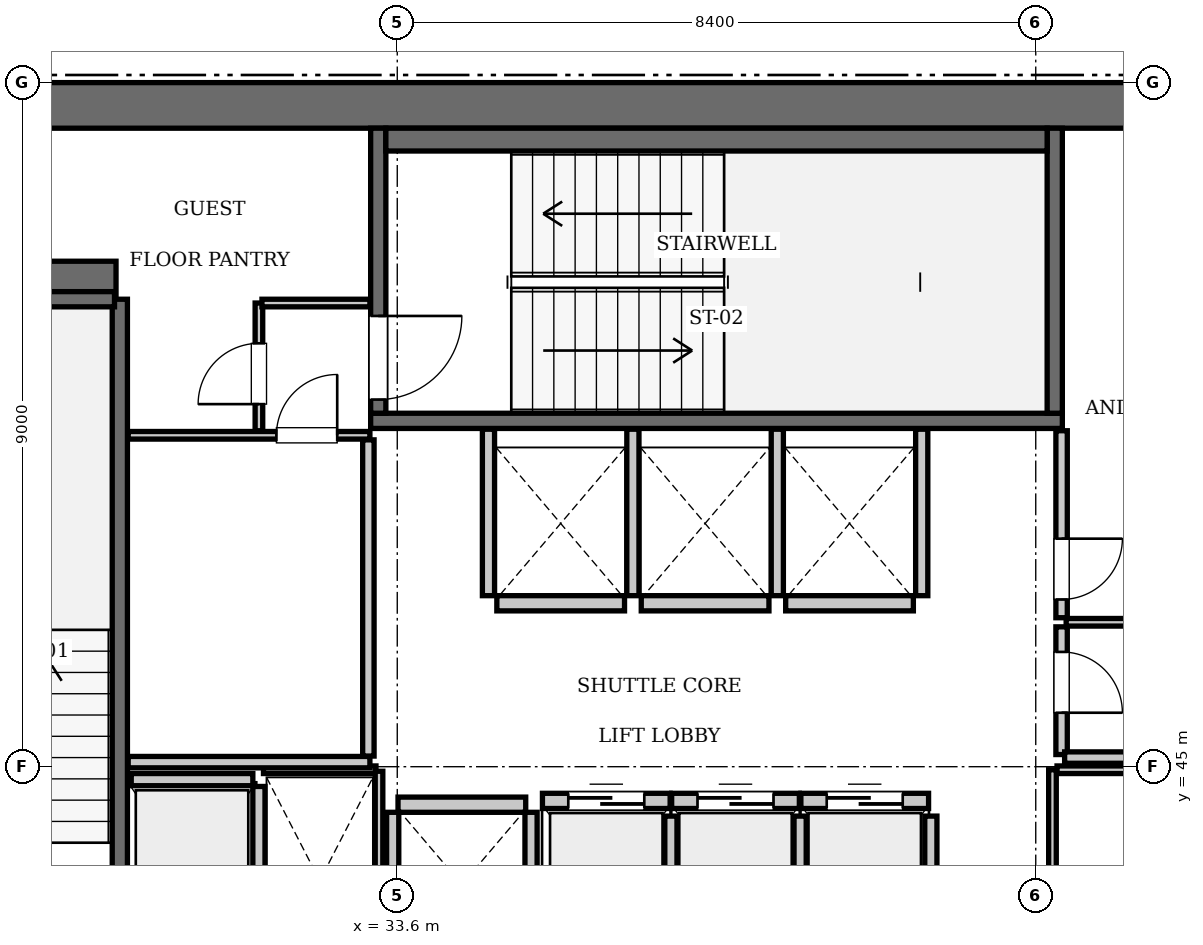
"""IFC4 building model, lengths in metres.
Left out: names, types, materials, properties, quantities, classifications, styles, units other than length and angle.
Written with IfcOpenShell. Run it as: python <this file> out.ifc"""

import sys

from ifc_helpers import new_model, si_unit, direction, frame, frame_2d, origin, place, context, subcontext, project, spatial, rectangle, extrude, element, fill, save


model = new_model("IFC4")
c1 = context("Model", 3, precision=1e-05, world=origin(), true_north=direction((0.0, 1.0)))
c2 = subcontext(c1, "Body", "Model", "MODEL_VIEW")
j1 = project(units=[si_unit("LENGTHUNIT", "METRE"), si_unit("PLANEANGLEUNIT", "RADIAN")], contexts=[c1])
p1 = place(None, origin())
s1 = spatial("IfcSite", under=j1, at=p1, CompositionType="ELEMENT")
p2 = place(p1, origin())
s2 = spatial("IfcBuilding", under=s1, at=p2, CompositionType="ELEMENT")
p3 = place(p2, frame((0.0, 0.0, 322.0)))
s3 = spatial("IfcBuildingStorey", under=s2, at=p3, CompositionType="ELEMENT", Elevation=322.0)
p4 = place(p3, frame((25.2, 53.7, 0.0), z_axis=(0.0, 0.0, 1.0), x_axis=(1.0, 0.0, 0.0)))
e1 = element("IfcWall", 1, at=p4, inside=s3, PredefinedType="SHEAR", context=c2, shape_type="SweptSolid", body=[
    extrude(rectangle(XDim=25.2, YDim=0.6, at=frame_2d((12.6, 0.0))), origin(), (0.0, 0.0, 1.0), 3.85),
])
p5 = place(p3, frame((25.8, 51.4, 0.0), z_axis=(0.0, 0.0, 1.0), x_axis=(1.0, 0.0, 0.0)))
e2 = element("IfcWall", 2, at=p5, inside=s3, PredefinedType="SHEAR", context=c2, shape_type="SweptSolid", body=[
    extrude(rectangle(XDim=4.1, YDim=0.5, at=frame_2d((2.05, 0.0))), origin(), (0.0, 0.0, 1.0), 3.85),
])
p6 = place(p3, frame((29.95, 42.0, 0.0), z_axis=(0.0, 0.0, 1.0), x_axis=(0.0, 1.0, 0.0)))
e3 = element("IfcWall", 3, at=p6, inside=s3, PredefinedType="SOLIDWALL", context=c2, shape_type="SweptSolid", body=[
    extrude(rectangle(XDim=9.15, YDim=0.2, at=frame_2d((4.575, 0.0))), origin(), (0.0, 0.0, 1.0), 3.61),
])
p7 = place(p3, frame((26.38, 51.15, 0.0), z_axis=(0.0, 0.0, 1.0), x_axis=(1.0, 0.0, 0.0)))
e4 = element("IfcWall", 4, at=p7, inside=s3, PredefinedType="SOLIDWALL", context=c2, shape_type="SweptSolid", body=[
    extrude(rectangle(XDim=3.5, YDim=0.2, at=frame_2d((1.75, 0.0))), origin(), (0.0, 0.0, 1.0), 3.61),
])
p8 = place(p3, frame((33.25, 49.55, 0.0), z_axis=(0.0, 0.0, 1.0), x_axis=(1.0, 0.0, 0.0)))
e5 = element("IfcWall", 5, at=p8, inside=s3, PredefinedType="SOLIDWALL", context=c2, shape_type="SweptSolid", body=[
    extrude(rectangle(XDim=9.1, YDim=0.2, at=frame_2d((4.55, 0.0))), origin(), (0.0, 0.0, 1.0), 3.61),
])
p9 = place(p3, frame((42.25, 49.65, 0.0), z_axis=(0.0, 0.0, 1.0), x_axis=(0.0, 1.0, 0.0)))
e6 = element("IfcWall", 6, at=p9, inside=s3, PredefinedType="SOLIDWALL", context=c2, shape_type="SweptSolid", body=[
    extrude(rectangle(XDim=3.75, YDim=0.2, at=frame_2d((1.875, 0.0))), origin(), (0.0, 0.0, 1.0), 3.61),
])
p10 = place(p3, frame((33.35, 49.65, 0.0), z_axis=(0.0, 0.0, 1.0), x_axis=(0.0, 1.0, 0.0)))
e7 = element("IfcWall", 7, at=p10, inside=s3, PredefinedType="SOLIDWALL", context=c2, shape_type="SweptSolid", body=[
    extrude(rectangle(XDim=3.75, YDim=0.2, at=frame_2d((1.875, 0.0))), origin(), (0.0, 0.0, 1.0), 3.61),
])
p11 = place(p10, frame((0.18, 0.0, 0.0)))
e8 = element("IfcOpeningElement", 8, at=p11, cuts=e7, PredefinedType="OPENING", context=c2, shape_type="SweptSolid", body=[
    extrude(rectangle(XDim=1.1, YDim=2.15, at=frame_2d((0.55, 1.075))), frame((0.0, 0.11, 0.0), z_axis=(0.0, -1.0, 0.0), x_axis=(1.0, 0.0, 0.0)), (0.0, 0.0, 1.0), 0.22),
])
p12 = place(p3, frame((33.45, 53.25, 0.0), z_axis=(0.0, 0.0, 1.0), x_axis=(1.0, 0.0, 0.0)))
e9 = element("IfcWall", 9, at=p12, inside=s3, PredefinedType="SOLIDWALL", context=c2, shape_type="SweptSolid", body=[
    extrude(rectangle(XDim=8.7, YDim=0.3, at=frame_2d((4.35, 0.0))), origin(), (0.0, 0.0, 1.0), 3.61),
])
p13 = place(p3, frame((35.51, 44.55, 0.0), z_axis=(0.0, 0.0, 1.0), x_axis=(1.0, 0.0, 0.0)))
e10 = element("IfcWall", 10, at=p13, inside=s3, PredefinedType="SOLIDWALL", context=c2, shape_type="SweptSolid", body=[
    extrude(rectangle(XDim=1.68, YDim=0.2, at=frame_2d((0.84, 0.0))), origin(), (0.0, 0.0, 1.0), 3.61),
])
p14 = place(p13, frame((0.34, 0.0, 0.0)))
e11 = element("IfcOpeningElement", 11, at=p14, cuts=e10, PredefinedType="OPENING", context=c2, shape_type="SweptSolid", body=[
    extrude(rectangle(XDim=1.0, YDim=2.15, at=frame_2d((0.5, 1.075))), frame((0.0, 0.11, 0.0), z_axis=(0.0, -1.0, 0.0), x_axis=(1.0, 0.0, 0.0)), (0.0, 0.0, 1.0), 0.22),
])
p15 = place(p3, frame((37.21, 44.55, 0.0), z_axis=(0.0, 0.0, 1.0), x_axis=(1.0, 0.0, 0.0)))
e12 = element("IfcWall", 12, at=p15, inside=s3, PredefinedType="SOLIDWALL", context=c2, shape_type="SweptSolid", body=[
    extrude(rectangle(XDim=1.68, YDim=0.2, at=frame_2d((0.84, 0.0))), origin(), (0.0, 0.0, 1.0), 3.61),
])
p16 = place(p15, frame((0.34, 0.0, 0.0)))
e13 = element("IfcOpeningElement", 13, at=p16, cuts=e12, PredefinedType="OPENING", context=c2, shape_type="SweptSolid", body=[
    extrude(rectangle(XDim=1.0, YDim=2.15, at=frame_2d((0.5, 1.075))), frame((0.0, 0.11, 0.0), z_axis=(0.0, -1.0, 0.0), x_axis=(1.0, 0.0, 0.0)), (0.0, 0.0, 1.0), 0.22),
])
p17 = place(p3, frame((38.91, 44.55, 0.0), z_axis=(0.0, 0.0, 1.0), x_axis=(1.0, 0.0, 0.0)))
e14 = element("IfcWall", 14, at=p17, inside=s3, PredefinedType="SOLIDWALL", context=c2, shape_type="SweptSolid", body=[
    extrude(rectangle(XDim=1.68, YDim=0.2, at=frame_2d((0.84, 0.0))), origin(), (0.0, 0.0, 1.0), 3.61),
])
p18 = place(p17, frame((0.34, 0.0, 0.0)))
e15 = element("IfcOpeningElement", 15, at=p18, cuts=e14, PredefinedType="OPENING", context=c2, shape_type="SweptSolid", body=[
    extrude(rectangle(XDim=1.0, YDim=2.15, at=frame_2d((0.5, 1.075))), frame((0.0, 0.11, 0.0), z_axis=(0.0, -1.0, 0.0), x_axis=(1.0, 0.0, 0.0)), (0.0, 0.0, 1.0), 0.22),
])
p19 = place(p3, frame((34.91, 47.15, 0.0), z_axis=(0.0, 0.0, 1.0), x_axis=(1.0, 0.0, 0.0)))
e16 = element("IfcWall", 16, at=p19, inside=s3, PredefinedType="SOLIDWALL", context=c2, shape_type="SweptSolid", body=[
    extrude(rectangle(XDim=1.68, YDim=0.2, at=frame_2d((0.84, 0.0))), origin(), (0.0, 0.0, 1.0), 3.61),
])
for number, where, z_axis, x_axis in (
    (17, (36.81, 47.15, 0.0), (0.0, 0.0, 1.0), (1.0, 0.0, 0.0)),
    (18, (38.71, 47.15, 0.0), (0.0, 0.0, 1.0), (1.0, 0.0, 0.0)),
    (19, (33.61, 44.5, 0.0), (0.0, 0.0, 1.0), (1.0, 0.0, 0.0)),
):
    element("IfcWall", number, at=place(p3, frame(where, z_axis=z_axis, x_axis=x_axis)), inside=s3, PredefinedType="SOLIDWALL", context=c2, shape_type="SweptSolid", body=[
        extrude(rectangle(XDim=1.68, YDim=0.2, at=frame_2d((0.84, 0.0))), origin(), (0.0, 0.0, 1.0), 3.61),
    ])
p20 = place(p3, frame((30.1, 44.83, 0.0), z_axis=(0.0, 0.0, 1.0), x_axis=(1.0, 0.0, 0.0)))
e20 = element("IfcWall", 20, at=p20, inside=s3, PredefinedType="SOLIDWALL", context=c2, shape_type="SweptSolid", body=[
    extrude(rectangle(XDim=1.6, YDim=0.16, at=frame_2d((0.8, 0.0))), origin(), (0.0, 0.0, 1.0), 3.61),
])
p21 = place(p3, frame((31.78, 42.0, 0.0), z_axis=(0.0, 0.0, 1.0), x_axis=(0.0, 1.0, 0.0)))
e21 = element("IfcWall", 21, at=p21, inside=s3, PredefinedType="SOLIDWALL", context=c2, shape_type="SweptSolid", body=[
    extrude(rectangle(XDim=2.74, YDim=0.16, at=frame_2d((1.37, 0.0))), origin(), (0.0, 0.0, 1.0), 3.61),
])
for number, where, z_axis, x_axis in (
    (22, (37.2, 42.0, 0.0), (0.0, 0.0, 1.0), (0.0, 1.0, 0.0)),
    (23, (38.9, 42.0, 0.0), (0.0, 0.0, 1.0), (0.0, 1.0, 0.0)),
    (24, (40.62, 42.0, 0.0), (0.0, 0.0, 1.0), (0.0, 1.0, 0.0)),
):
    element("IfcWall", number, at=place(p3, frame(where, z_axis=z_axis, x_axis=x_axis)), inside=s3, PredefinedType="SOLIDWALL", context=c2, shape_type="SweptSolid", body=[
        extrude(rectangle(XDim=2.35, YDim=0.16, at=frame_2d((1.175, 0.0))), origin(), (0.0, 0.0, 1.0), 3.61),
    ])
for number, where, z_axis, x_axis in (
    (25, (34.8, 47.25, 0.0), (0.0, 0.0, 1.0), (0.0, 1.0, 0.0)),
    (26, (36.7, 47.25, 0.0), (0.0, 0.0, 1.0), (0.0, 1.0, 0.0)),
    (27, (38.6, 47.25, 0.0), (0.0, 0.0, 1.0), (0.0, 1.0, 0.0)),
    (28, (40.5, 47.25, 0.0), (0.0, 0.0, 1.0), (0.0, 1.0, 0.0)),
):
    element("IfcWall", number, at=place(p3, frame(where, z_axis=z_axis, x_axis=x_axis)), inside=s3, PredefinedType="SOLIDWALL", context=c2, shape_type="SweptSolid", body=[
        extrude(rectangle(XDim=2.19, YDim=0.16, at=frame_2d((1.095, 0.0))), origin(), (0.0, 0.0, 1.0), 3.61),
    ])
for number, where, z_axis, x_axis in (
    (29, (33.54, 42.0, 0.0), (0.0, 0.0, 1.0), (0.0, 1.0, 0.0)),
    (30, (35.36, 42.0, 0.0), (0.0, 0.0, 1.0), (0.0, 1.0, 0.0)),
):
    element("IfcWall", number, at=place(p3, frame(where, z_axis=z_axis, x_axis=x_axis)), inside=s3, PredefinedType="SOLIDWALL", context=c2, shape_type="SweptSolid", body=[
        extrude(rectangle(XDim=2.4, YDim=0.16, at=frame_2d((1.2, 0.0))), origin(), (0.0, 0.0, 1.0), 3.61),
    ])
p22 = place(p3, frame((31.84, 44.96, 0.0), z_axis=(0.0, 0.0, 1.0), x_axis=(1.0, 0.0, 0.0)))
e31 = element("IfcWall", 31, at=p22, inside=s3, PredefinedType="PARTITIONING", context=c2, shape_type="SweptSolid", body=[
    extrude(rectangle(XDim=1.48, YDim=0.1, at=frame_2d((0.74, 0.0))), origin(), (0.0, 0.0, 1.0), 3.61),
])
p23 = place(p3, frame((33.36, 42.06, 0.0), z_axis=(0.0, 0.0, 1.0), x_axis=(0.0, 1.0, 0.0)))
e32 = element("IfcWall", 32, at=p23, inside=s3, PredefinedType="PARTITIONING", context=c2, shape_type="SweptSolid", body=[
    extrude(rectangle(XDim=2.88, YDim=0.1, at=frame_2d((1.44, 0.0))), origin(), (0.0, 0.0, 1.0), 3.61),
])
p24 = place(p3, frame((42.22, 42.05, 0.0), z_axis=(0.0, 0.0, 1.0), x_axis=(0.0, 1.0, 0.0)))
e33 = element("IfcWall", 33, at=p24, inside=s3, PredefinedType="PARTITIONING", context=c2, shape_type="SweptSolid", body=[
    extrude(rectangle(XDim=2.91, YDim=0.1, at=frame_2d((1.455, 0.0))), origin(), (0.0, 0.0, 1.0), 3.61),
])
p25 = place(p24, frame((0.65, 0.0, 0.0)))
e34 = element("IfcOpeningElement", 34, at=p25, cuts=e33, PredefinedType="OPENING", context=c2, shape_type="SweptSolid", body=[
    extrude(rectangle(XDim=0.8, YDim=2.05, at=frame_2d((0.4, 1.025))), frame((0.0, 0.06, 0.0), z_axis=(0.0, -1.0, 0.0), x_axis=(1.0, 0.0, 0.0)), (0.0, 0.0, 1.0), 0.12),
])
p26 = place(p3, frame((42.28, 44.96, 0.0), z_axis=(0.0, 0.0, 1.0), x_axis=(1.0, 0.0, 0.0)))
e35 = element("IfcWall", 35, at=p26, inside=s3, PredefinedType="PARTITIONING", context=c2, shape_type="SweptSolid", body=[
    extrude(rectangle(XDim=1.3, YDim=0.1, at=frame_2d((0.65, 0.0))), origin(), (0.0, 0.0, 1.0), 3.61),
])
p27 = place(p3, frame((30.06, 45.06, 0.0), z_axis=(0.0, 0.0, 1.0), x_axis=(1.0, 0.0, 0.0)))
e36 = element("IfcWall", 36, at=p27, inside=s3, PredefinedType="PARTITIONING", context=c2, shape_type="SweptSolid", body=[
    extrude(rectangle(XDim=3.18, YDim=0.15, at=frame_2d((1.59, 0.0))), origin(), (0.0, 0.0, 1.0), 3.61),
])
p28 = place(p3, frame((33.22, 45.14, 0.0), z_axis=(0.0, 0.0, 1.0), x_axis=(0.0, 1.0, 0.0)))
e37 = element("IfcWall", 37, at=p28, inside=s3, PredefinedType="PARTITIONING", context=c2, shape_type="SweptSolid", body=[
    extrude(rectangle(XDim=4.16, YDim=0.15, at=frame_2d((2.08, 0.0))), origin(), (0.0, 0.0, 1.0), 3.61),
])
p29 = place(p3, frame((30.06, 49.36, 0.0), z_axis=(0.0, 0.0, 1.0), x_axis=(1.0, 0.0, 0.0)))
e38 = element("IfcWall", 38, at=p29, inside=s3, PredefinedType="PARTITIONING", context=c2, shape_type="SweptSolid", body=[
    extrude(rectangle(XDim=3.18, YDim=0.1, at=frame_2d((1.59, 0.0))), origin(), (0.0, 0.0, 1.0), 3.61),
])
p30 = place(p29, frame((1.95, 0.0, 0.0)))
e39 = element("IfcOpeningElement", 39, at=p30, cuts=e38, PredefinedType="OPENING", context=c2, shape_type="SweptSolid", body=[
    extrude(rectangle(XDim=0.8, YDim=2.05, at=frame_2d((0.4, 1.025))), frame((0.0, 0.06, 0.0), z_axis=(0.0, -1.0, 0.0), x_axis=(1.0, 0.0, 0.0)), (0.0, 0.0, 1.0), 0.12),
])
p31 = place(p3, frame((31.78, 49.42, 0.0), z_axis=(0.0, 0.0, 1.0), x_axis=(0.0, 1.0, 0.0)))
e40 = element("IfcWall", 40, at=p31, inside=s3, PredefinedType="PARTITIONING", context=c2, shape_type="SweptSolid", body=[
    extrude(rectangle(XDim=1.68, YDim=0.1, at=frame_2d((0.84, 0.0))), origin(), (0.0, 0.0, 1.0), 3.61),
])
p32 = place(p31, frame((0.35, 0.0, 0.0)))
e41 = element("IfcOpeningElement", 41, at=p32, cuts=e40, PredefinedType="OPENING", context=c2, shape_type="SweptSolid", body=[
    extrude(rectangle(XDim=0.8, YDim=2.05, at=frame_2d((0.4, 1.025))), frame((0.0, 0.06, 0.0), z_axis=(0.0, -1.0, 0.0), x_axis=(1.0, 0.0, 0.0)), (0.0, 0.0, 1.0), 0.12),
])
p33 = place(p3, frame((31.82, 51.1, 0.0), z_axis=(0.0, 0.0, 1.0), x_axis=(1.0, 0.0, 0.0)))
e42 = element("IfcWall", 42, at=p33, inside=s3, PredefinedType="PARTITIONING", context=c2, shape_type="SweptSolid", body=[
    extrude(rectangle(XDim=1.42, YDim=0.1, at=frame_2d((0.71, 0.0))), origin(), (0.0, 0.0, 1.0), 3.61),
])
p34 = place(p3, frame((42.34, 45.16, 0.0), z_axis=(0.0, 0.0, 1.0), x_axis=(0.0, 1.0, 0.0)))
e43 = element("IfcWall", 43, at=p34, inside=s3, PredefinedType="PARTITIONING", context=c2, shape_type="SweptSolid", body=[
    extrude(rectangle(XDim=1.68, YDim=0.15, at=frame_2d((0.84, 0.0))), origin(), (0.0, 0.0, 1.0), 3.61),
])
p35 = place(p34, frame((0.55, 0.0, 0.0)))
e44 = element("IfcOpeningElement", 44, at=p35, cuts=e43, PredefinedType="OPENING", context=c2, shape_type="SweptSolid", body=[
    extrude(rectangle(XDim=0.8, YDim=2.05, at=frame_2d((0.4, 1.025))), frame((0.0, 0.085, 0.0), z_axis=(0.0, -1.0, 0.0), x_axis=(1.0, 0.0, 0.0)), (0.0, 0.0, 1.0), 0.17),
])
p36 = place(p3, frame((42.34, 46.96, 0.0), z_axis=(0.0, 0.0, 1.0), x_axis=(0.0, 1.0, 0.0)))
e45 = element("IfcWall", 45, at=p36, inside=s3, PredefinedType="PARTITIONING", context=c2, shape_type="SweptSolid", body=[
    extrude(rectangle(XDim=2.46, YDim=0.15, at=frame_2d((1.23, 0.0))), origin(), (0.0, 0.0, 1.0), 3.61),
])
p37 = place(p36, frame((0.24, 0.0, 0.0)))
e46 = element("IfcOpeningElement", 46, at=p37, cuts=e45, PredefinedType="OPENING", context=c2, shape_type="SweptSolid", body=[
    extrude(rectangle(XDim=0.8, YDim=2.05, at=frame_2d((0.4, 1.025))), frame((0.0, 0.085, 0.0), z_axis=(0.0, -1.0, 0.0), x_axis=(1.0, 0.0, 0.0)), (0.0, 0.0, 1.0), 0.17),
])
p38 = place(p3, frame((42.4, 46.9, 0.0), z_axis=(0.0, 0.0, 1.0), x_axis=(1.0, 0.0, 0.0)))
e47 = element("IfcWall", 47, at=p38, inside=s3, PredefinedType="PARTITIONING", context=c2, shape_type="SweptSolid", body=[
    extrude(rectangle(XDim=3.1, YDim=0.1, at=frame_2d((1.55, 0.0))), origin(), (0.0, 0.0, 1.0), 3.61),
])
p39 = place(p3, frame((42.38, 45.12, 0.0), z_axis=(0.0, 0.0, 1.0), x_axis=(1.0, 0.0, 0.0)))
e48 = element("IfcWall", 48, at=p39, inside=s3, PredefinedType="PARTITIONING", context=c2, shape_type="SweptSolid", body=[
    extrude(rectangle(XDim=3.14, YDim=0.15, at=frame_2d((1.57, 0.0))), origin(), (0.0, 0.0, 1.0), 3.61),
])
p40 = place(p11, frame((1.1, 0.0, 0.0), z_axis=(0.0, 0.0, 1.0), x_axis=(-1.0, 0.0, 0.0)))
e49 = element("IfcDoor", 49, at=p40, inside=s3, OperationType="SINGLE_SWING_LEFT", PredefinedType="DOOR", context=c2, shape_type="SweptSolid", body=[
    extrude(rectangle(XDim=1.1, YDim=2.15, at=frame_2d((0.55, 1.075))), frame((0.0, 0.025, 0.0), z_axis=(0.0, -1.0, 0.0), x_axis=(1.0, 0.0, 0.0)), (0.0, 0.0, 1.0), 0.05),
])
fill(e8, e49)
p41 = place(p14, origin())
e50 = element("IfcDoor", 50, at=p41, inside=s3, OperationType="SLIDING_TO_LEFT", PredefinedType="DOOR", context=c2, shape_type="SweptSolid", body=[
    extrude(rectangle(XDim=1.0, YDim=2.15, at=frame_2d((0.5, 1.075))), frame((0.0, 0.025, 0.0), z_axis=(0.0, -1.0, 0.0), x_axis=(1.0, 0.0, 0.0)), (0.0, 0.0, 1.0), 0.05),
])
fill(e11, e50)
p42 = place(p16, origin())
e51 = element("IfcDoor", 51, at=p42, inside=s3, OperationType="SLIDING_TO_LEFT", PredefinedType="DOOR", context=c2, shape_type="SweptSolid", body=[
    extrude(rectangle(XDim=1.0, YDim=2.15, at=frame_2d((0.5, 1.075))), frame((0.0, 0.025, 0.0), z_axis=(0.0, -1.0, 0.0), x_axis=(1.0, 0.0, 0.0)), (0.0, 0.0, 1.0), 0.05),
])
fill(e13, e51)
p43 = place(p18, origin())
e52 = element("IfcDoor", 52, at=p43, inside=s3, OperationType="SLIDING_TO_LEFT", PredefinedType="DOOR", context=c2, shape_type="SweptSolid", body=[
    extrude(rectangle(XDim=1.0, YDim=2.15, at=frame_2d((0.5, 1.075))), frame((0.0, 0.025, 0.0), z_axis=(0.0, -1.0, 0.0), x_axis=(1.0, 0.0, 0.0)), (0.0, 0.0, 1.0), 0.05),
])
fill(e15, e52)
p44 = place(p30, origin())
e53 = element("IfcDoor", 53, at=p44, inside=s3, OperationType="SINGLE_SWING_RIGHT", PredefinedType="DOOR", context=c2, shape_type="SweptSolid", body=[
    extrude(rectangle(XDim=0.8, YDim=2.05, at=frame_2d((0.4, 1.025))), frame((0.0, 0.025, 0.0), z_axis=(0.0, -1.0, 0.0), x_axis=(1.0, 0.0, 0.0)), (0.0, 0.0, 1.0), 0.05),
])
fill(e39, e53)
p45 = place(p32, origin())
e54 = element("IfcDoor", 54, at=p45, inside=s3, OperationType="SINGLE_SWING_LEFT", PredefinedType="DOOR", context=c2, shape_type="SweptSolid", body=[
    extrude(rectangle(XDim=0.8, YDim=2.05, at=frame_2d((0.4, 1.025))), frame((0.0, 0.025, 0.0), z_axis=(0.0, -1.0, 0.0), x_axis=(1.0, 0.0, 0.0)), (0.0, 0.0, 1.0), 0.05),
])
fill(e41, e54)
p46 = place(p35, frame((0.8, 0.0, 0.0), z_axis=(0.0, 0.0, 1.0), x_axis=(-1.0, 0.0, 0.0)))
e55 = element("IfcDoor", 55, at=p46, inside=s3, OperationType="SINGLE_SWING_RIGHT", PredefinedType="DOOR", context=c2, shape_type="SweptSolid", body=[
    extrude(rectangle(XDim=0.8, YDim=2.05, at=frame_2d((0.4, 1.025))), frame((0.0, 0.025, 0.0), z_axis=(0.0, -1.0, 0.0), x_axis=(1.0, 0.0, 0.0)), (0.0, 0.0, 1.0), 0.05),
])
fill(e44, e55)
p47 = place(p37, frame((0.8, 0.0, 0.0), z_axis=(0.0, 0.0, 1.0), x_axis=(-1.0, 0.0, 0.0)))
e56 = element("IfcDoor", 56, at=p47, inside=s3, OperationType="SINGLE_SWING_LEFT", PredefinedType="DOOR", context=c2, shape_type="SweptSolid", body=[
    extrude(rectangle(XDim=0.8, YDim=2.05, at=frame_2d((0.4, 1.025))), frame((0.0, 0.025, 0.0), z_axis=(0.0, -1.0, 0.0), x_axis=(1.0, 0.0, 0.0)), (0.0, 0.0, 1.0), 0.05),
])
fill(e46, e56)
save(model, sys.argv[1])
